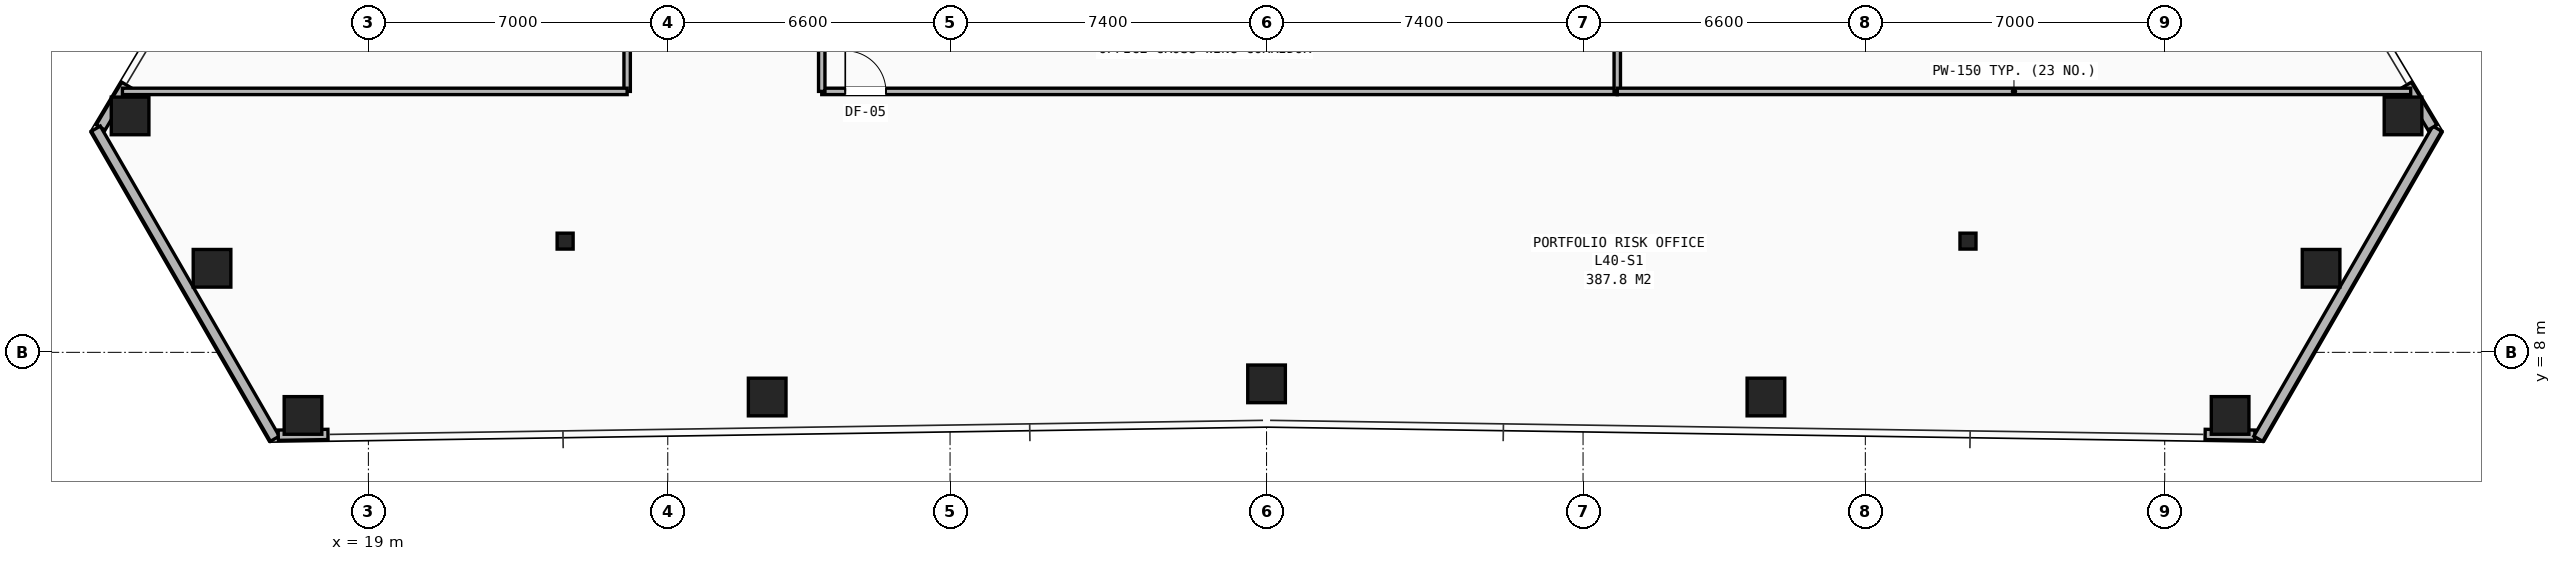
"""IFC4 building model, lengths in metres.
Left out: names, types, materials, properties, quantities, classifications, styles, units other than length and angle.
Written with IfcOpenShell. Run it as: python <this file> out.ifc"""

import sys

from ifc_helpers import new_model, si_unit, direction, frame, frame_2d, origin, origin_2d, place, context, subcontext, project, spatial, rectangle, hollow_rectangle, i_section, extrude, element, fill, save


model = new_model("IFC4")
c1 = context("Model", 3, precision=1e-05, world=origin(), true_north=direction((0.0, 1.0)))
c2 = subcontext(c1, "Body", "Model", "MODEL_VIEW")
j1 = project(units=[si_unit("LENGTHUNIT", "METRE"), si_unit("PLANEANGLEUNIT", "RADIAN")], contexts=[c1])
p1 = place(None, origin())
s1 = spatial("IfcSite", under=j1, at=p1, CompositionType="ELEMENT")
p2 = place(p1, origin())
s2 = spatial("IfcBuilding", under=s1, at=p2, CompositionType="ELEMENT")
p3 = place(p2, frame((0.0, 0.0, 140.15)))
s3 = spatial("IfcBuildingStorey", under=s2, at=p3, CompositionType="ELEMENT", Elevation=140.15)
for number, where, z_axis, x_axis in (
    (1, (23.6, 10.6, 0.0), (0.0, 0.0, 1.0), (1.0, 0.0, 0.0)),
    (2, (56.4, 10.6, 0.0), (0.0, 0.0, 1.0), (1.0, 0.0, 0.0)),
):
    element("IfcColumn", number, at=place(p3, frame(where, z_axis=z_axis, x_axis=x_axis)), inside=s3, PredefinedType="COLUMN", context=c2, shape_type="SweptSolid", body=[
        extrude(i_section(OverallWidth=0.374, OverallDepth=0.372, WebThickness=0.016, FlangeThickness=0.026, at=origin_2d()), origin(), (0.0, 0.0, 1.0), 3.45),
    ])
for number, where, z_axis, x_axis in (
    (3, (13.428, 13.527, 0.0), (0.0, 0.0, 1.0), (1.0, 0.0, 0.0)),
    (4, (15.344, 9.965, 0.0), (0.0, 0.0, 1.0), (1.0, 0.0, 0.0)),
    (5, (17.471, 6.525, 0.0), (0.0, 0.0, 1.0), (1.0, 0.0, 0.0)),
    (6, (28.324, 6.956, 0.0), (0.0, 0.0, 1.0), (1.0, 0.0, 0.0)),
    (7, (40.0, 7.263, 0.0), (0.0, 0.0, 1.0), (1.0, 0.0, 0.0)),
    (8, (51.676, 6.956, 0.0), (0.0, 0.0, 1.0), (1.0, 0.0, 0.0)),
    (9, (62.529, 6.525, 0.0), (0.0, 0.0, 1.0), (1.0, 0.0, 0.0)),
    (10, (64.656, 9.965, 0.0), (0.0, 0.0, 1.0), (1.0, 0.0, 0.0)),
    (11, (66.572, 13.527, 0.0), (0.0, 0.0, 1.0), (1.0, 0.0, 0.0)),
):
    element("IfcColumn", number, at=place(p3, frame(where, z_axis=z_axis, x_axis=x_axis)), inside=s3, PredefinedType="COLUMN", context=c2, shape_type="SweptSolid", body=[
        extrude(hollow_rectangle(XDim=0.88, YDim=0.88, WallThickness=0.06, at=origin_2d()), origin(), (0.0, 0.0, 1.0), 3.45),
    ])
p4 = place(p3, frame((13.336, 14.254, 0.0), z_axis=(0.0, 0.0, 1.0), x_axis=(-0.512919581386, -0.858436662213, 0.0)))
e12 = element("IfcWall", 12, at=p4, inside=s3, PredefinedType="SHEAR", context=c2, shape_type="SweptSolid", body=[
    extrude(rectangle(XDim=1.162, YDim=0.24, at=frame_2d((0.581, 0.0))), origin(), (0.0, 0.0, 1.0), 2.583),
])
p5 = place(p3, frame((16.813, 5.98, 0.0), z_axis=(0.0, 0.0, 1.0), x_axis=(-0.500012768347, 0.86601803185, 0.0)))
e13 = element("IfcWall", 13, at=p5, inside=s3, PredefinedType="SHEAR", context=c2, shape_type="SweptSolid", body=[
    extrude(rectangle(XDim=8.371, YDim=0.24, at=frame_2d((4.186, 0.0))), origin(), (0.0, 0.0, 1.0), 2.583),
])
for number, where, z_axis, x_axis in (
    (14, (16.893, 6.063, 0.0), (0.0, 0.0, 1.0), (1.0, 0.015, 0.0)),
    (15, (61.945, 6.081, 0.0), (0.0, 0.0, 1.0), (1.0, -0.015, 0.0)),
):
    element("IfcWall", number, at=place(p3, frame(where, z_axis=z_axis, x_axis=x_axis)), inside=s3, PredefinedType="SHEAR", context=c2, shape_type="SweptSolid", body=[
        extrude(rectangle(XDim=1.163, YDim=0.24, at=frame_2d((0.581, 0.0))), origin(), (0.0, 0.0, 1.0), 2.583),
    ])
p6 = place(p3, frame((67.372, 13.23, 0.0), z_axis=(0.0, 0.0, 1.0), x_axis=(-0.500012768347, -0.86601803185, 0.0)))
e16 = element("IfcWall", 16, at=p6, inside=s3, PredefinedType="SHEAR", context=c2, shape_type="SweptSolid", body=[
    extrude(rectangle(XDim=8.371, YDim=0.24, at=frame_2d((4.186, 0.0))), origin(), (0.0, 0.0, 1.0), 2.583),
])
p7 = place(p3, frame((67.26, 13.257, 0.0), z_axis=(0.0, 0.0, 1.0), x_axis=(-0.512919581386, 0.858436662213, 0.0)))
e17 = element("IfcWall", 17, at=p7, inside=s3, PredefinedType="SHEAR", context=c2, shape_type="SweptSolid", body=[
    extrude(rectangle(XDim=1.162, YDim=0.24, at=frame_2d((0.581, 0.0))), origin(), (0.0, 0.0, 1.0), 2.583),
])
p8 = place(p3, frame((29.6, 14.1, 0.0), z_axis=(0.0, 0.0, 1.0), x_axis=(1.0, 0.0, 0.0)))
e18 = element("IfcWall", 18, at=p8, inside=s3, PredefinedType="PARTITIONING", context=c2, shape_type="SweptSolid", body=[
    extrude(rectangle(XDim=18.6, YDim=0.15, at=frame_2d((9.3, 0.0))), origin(), (0.0, 0.0, 1.0), 2.252),
])
p9 = place(p8, frame((0.55, 0.0, 0.0)))
e19 = element("IfcOpeningElement", 19, at=p9, cuts=e18, PredefinedType="OPENING", context=c2, shape_type="SweptSolid", body=[
    extrude(rectangle(XDim=0.95, YDim=2.1, at=frame_2d((0.475, 1.05))), frame((0.0, 0.085, 0.0), z_axis=(0.0, -1.0, 0.0), x_axis=(1.0, 0.0, 0.0)), (0.0, 0.0, 1.0), 0.17),
])
p10 = place(p3, frame((48.2, 14.1, 0.0), z_axis=(0.0, 0.0, 1.0), x_axis=(0.0, 1.0, 0.0)))
e20 = element("IfcWall", 20, at=p10, inside=s3, PredefinedType="PARTITIONING", context=c2, shape_type="SweptSolid", body=[
    extrude(rectangle(XDim=2.3, YDim=0.15, at=frame_2d((1.15, 0.0))), origin(), (0.0, 0.0, 1.0), 2.661),
])
p11 = place(p3, frame((29.6, 14.1, 0.0), z_axis=(0.0, 0.0, 1.0), x_axis=(0.0, 1.0, 0.0)))
e21 = element("IfcWall", 21, at=p11, inside=s3, PredefinedType="PARTITIONING", context=c2, shape_type="SweptSolid", body=[
    extrude(rectangle(XDim=8.7, YDim=0.15, at=frame_2d((4.35, 0.0))), origin(), (0.0, 0.0, 1.0), 3.21),
])
p12 = place(p11, frame((2.65, 0.0, 0.0)))
e22 = element("IfcOpeningElement", 22, at=p12, cuts=e21, PredefinedType="OPENING", context=c2, shape_type="SweptSolid", body=[
    extrude(rectangle(XDim=0.85, YDim=2.05, at=frame_2d((0.425, 1.025))), frame((0.0, 0.085, 0.0), z_axis=(0.0, -1.0, 0.0), x_axis=(1.0, 0.0, 0.0)), (0.0, 0.0, 1.0), 0.17),
])
p13 = place(p11, frame((4.75, 0.0, 0.0)))
e23 = element("IfcOpeningElement", 23, at=p13, cuts=e21, PredefinedType="OPENING", context=c2, shape_type="SweptSolid", body=[
    extrude(rectangle(XDim=0.85, YDim=2.05, at=frame_2d((0.425, 1.025))), frame((0.0, 0.085, 0.0), z_axis=(0.0, -1.0, 0.0), x_axis=(1.0, 0.0, 0.0)), (0.0, 0.0, 1.0), 0.17),
])
p14 = place(p11, frame((6.85, 0.0, 0.0)))
e24 = element("IfcOpeningElement", 24, at=p14, cuts=e21, PredefinedType="OPENING", context=c2, shape_type="SweptSolid", body=[
    extrude(rectangle(XDim=0.85, YDim=2.05, at=frame_2d((0.425, 1.025))), frame((0.0, 0.085, 0.0), z_axis=(0.0, -1.0, 0.0), x_axis=(1.0, 0.0, 0.0)), (0.0, 0.0, 1.0), 0.17),
])
p15 = place(p3, frame((25.05, 14.1, 0.0), z_axis=(0.0, 0.0, 1.0), x_axis=(0.0, 1.0, 0.0)))
e25 = element("IfcWall", 25, at=p15, inside=s3, PredefinedType="PARTITIONING", context=c2, shape_type="SweptSolid", body=[
    extrude(rectangle(XDim=8.7, YDim=0.15, at=frame_2d((4.35, 0.0))), origin(), (0.0, 0.0, 1.0), 3.21),
])
p16 = place(p3, frame((13.249, 14.1, 0.0), z_axis=(0.0, 0.0, 1.0), x_axis=(1.0, 0.0, 0.0)))
e26 = element("IfcWall", 26, at=p16, inside=s3, PredefinedType="PARTITIONING", context=c2, shape_type="SweptSolid", body=[
    extrude(rectangle(XDim=11.801, YDim=0.15, at=frame_2d((5.9, 0.0))), origin(), (0.0, 0.0, 1.0), 2.589),
])
p17 = place(p3, frame((48.2, 14.1, 0.0), z_axis=(0.0, 0.0, 1.0), x_axis=(1.0, 0.0, 0.0)))
e27 = element("IfcWall", 27, at=p17, inside=s3, PredefinedType="PARTITIONING", context=c2, shape_type="SweptSolid", body=[
    extrude(rectangle(XDim=18.551, YDim=0.15, at=frame_2d((9.275, 0.0))), origin(), (0.0, 0.0, 1.0), 2.589),
])
p18 = place(p9, origin())
e28 = element("IfcDoor", 28, at=p18, inside=s3, OperationType="SINGLE_SWING_LEFT", PredefinedType="DOOR", context=c2, shape_type="SweptSolid", body=[
    extrude(rectangle(XDim=0.95, YDim=2.1, at=frame_2d((0.475, 1.05))), frame((0.0, 0.025, 0.0), z_axis=(0.0, -1.0, 0.0), x_axis=(1.0, 0.0, 0.0)), (0.0, 0.0, 1.0), 0.05),
])
fill(e19, e28)
save(model, sys.argv[1])
